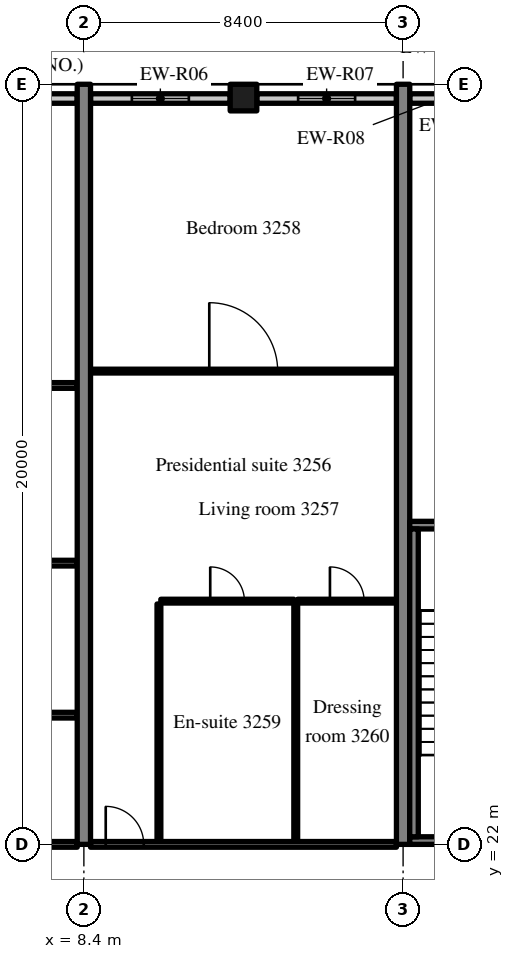
"""IFC4 building model, lengths in metres.
Left out: names, types, materials, properties, quantities, classifications, styles, units other than length and angle.
Written with IfcOpenShell. Run it as: python <this file> out.ifc"""

import sys

from ifc_helpers import new_model, si_unit, direction, frame, frame_2d, origin, origin_2d, place, context, subcontext, project, spatial, rectangle, extrude, source, transform, mapped, element, fill, save


model = new_model("IFC4")
c1 = context("Model", 3, precision=1e-05, world=origin(), true_north=direction((0.0, 1.0)))
c2 = subcontext(c1, "Body", "Model", "MODEL_VIEW")
j1 = project(units=[si_unit("LENGTHUNIT", "METRE"), si_unit("PLANEANGLEUNIT", "RADIAN")], contexts=[c1])
p1 = place(None, origin())
s1 = spatial("IfcSite", under=j1, at=p1, CompositionType="ELEMENT")
p2 = place(p1, origin())
s2 = spatial("IfcBuilding", under=s1, at=p2, CompositionType="ELEMENT")
p3 = place(p2, frame((0.0, 0.0, 133.2)))
s3 = spatial("IfcBuildingStorey", under=s2, at=p3, CompositionType="ELEMENT", Elevation=133.2)
m1 = source(origin(), c2, "Body", "SweptSolid", [
    extrude(rectangle(XDim=20.0, YDim=0.35, at=frame_2d((10.0, 0.0))), origin(), (0.0, 0.0, 1.0), 3.52),
])
for number, where, z_axis, x_axis in (
    (1, (8.4, 22.0, 0.0), (0.0, 0.0, 1.0), (0.0, 1.0, 0.0)),
    (2, (16.8, 22.0, 0.0), (0.0, 0.0, 1.0), (0.0, 1.0, 0.0)),
):
    element("IfcWall", number, at=place(p3, frame(where, z_axis=z_axis, x_axis=x_axis)), inside=s3, PredefinedType="SHEAR", context=c2, shape_type="MappedRepresentation", body=[
        mapped(m1, transform((0.0, 0.0, 0.0), scale=1.0)),
    ])
m2 = source(origin(), c2, "Body", "SweptSolid", [
    extrude(rectangle(XDim=0.7, YDim=0.7, at=origin_2d()), origin(), (0.0, 0.0, 1.0), 3.52),
])
p4 = place(p3, frame((12.6, 41.65, 0.0), z_axis=(0.0, 0.0, 1.0), x_axis=(1.0, 0.0, 0.0)))
e3 = element("IfcColumn", 3, at=p4, inside=s3, PredefinedType="COLUMN", context=c2, shape_type="MappedRepresentation", body=[
    mapped(m2, transform((0.0, 0.0, 0.0), scale=1.0)),
])
m3 = source(origin(), c2, "Body", "SweptSolid", [
    extrude(rectangle(XDim=4.07, YDim=0.25, at=frame_2d((2.035, 0.0))), origin(), (0.0, 0.0, 1.0), 2.82),
])
p5 = place(p3, frame((8.225, 41.625, 0.0), z_axis=(0.0, 0.0, 1.0), x_axis=(-1.0, 0.0, 0.0)))
e4 = element("IfcWall", 4, at=p5, inside=s3, PredefinedType="SOLIDWALL", context=c2, shape_type="MappedRepresentation", body=[
    mapped(m3, transform((0.0, 0.0, 0.0), scale=1.0)),
])
m4 = source(origin(), c2, "Body", "SweptSolid", [
    extrude(rectangle(XDim=1.5, YDim=1.5, at=frame_2d((0.75, 0.75))), frame((0.0, 0.135, 0.0), z_axis=(0.0, -1.0, 0.0), x_axis=(1.0, 0.0, 0.0)), (0.0, 0.0, 1.0), 0.27),
])
p6 = place(p5, frame((1.285, 0.0, 0.9)))
e5 = element("IfcOpeningElement", 5, at=p6, cuts=e4, PredefinedType="OPENING", context=c2, shape_type="MappedRepresentation", body=[
    mapped(m4, transform((0.0, 0.0, 0.0), scale=1.0)),
])
m5 = source(origin(), c2, "Body", "SweptSolid", [
    extrude(rectangle(XDim=3.675, YDim=0.25, at=frame_2d((1.837, 0.0))), origin(), (0.0, 0.0, 1.0), 2.82),
])
p7 = place(p3, frame((12.25, 41.625, 0.0), z_axis=(0.0, 0.0, 1.0), x_axis=(-1.0, 0.0, 0.0)))
e6 = element("IfcWall", 6, at=p7, inside=s3, PredefinedType="SOLIDWALL", context=c2, shape_type="MappedRepresentation", body=[
    mapped(m5, transform((0.0, 0.0, 0.0), scale=1.0)),
])
p8 = place(p7, frame((1.087, 0.0, 0.9)))
e7 = element("IfcOpeningElement", 7, at=p8, cuts=e6, PredefinedType="OPENING", context=c2, shape_type="MappedRepresentation", body=[
    mapped(m4, transform((0.0, 0.0, 0.0), scale=1.0)),
])
p9 = place(p3, frame((16.625, 41.625, 0.0), z_axis=(0.0, 0.0, 1.0), x_axis=(-1.0, 0.0, 0.0)))
e8 = element("IfcWall", 8, at=p9, inside=s3, PredefinedType="SOLIDWALL", context=c2, shape_type="MappedRepresentation", body=[
    mapped(m5, transform((0.0, 0.0, 0.0), scale=1.0)),
])
p10 = place(p9, frame((1.087, 0.0, 0.9)))
e9 = element("IfcOpeningElement", 9, at=p10, cuts=e8, PredefinedType="OPENING", context=c2, shape_type="MappedRepresentation", body=[
    mapped(m4, transform((0.0, 0.0, 0.0), scale=1.0)),
])
m6 = source(origin(), c2, "Body", "SweptSolid", [
    extrude(rectangle(XDim=1.683, YDim=0.25, at=frame_2d((0.841, 0.0))), origin(), (0.0, 0.0, 1.0), 2.82),
])
p11 = place(p3, frame((18.658, 41.625, 0.0), z_axis=(0.0, 0.0, 1.0), x_axis=(-1.0, 0.0, 0.0)))
e10 = element("IfcWall", 10, at=p11, inside=s3, PredefinedType="SOLIDWALL", context=c2, shape_type="MappedRepresentation", body=[
    mapped(m6, transform((0.0, 0.0, 0.0), scale=1.0)),
])
m7 = source(origin(), c2, "Body", "SweptSolid", [
    extrude(rectangle(XDim=8.225, YDim=0.2, at=frame_2d((4.112, 0.0))), origin(), (0.0, 0.0, 1.0), 3.52),
])
p12 = place(p3, frame((16.975, 22.1, 0.0), z_axis=(0.0, 0.0, 1.0), x_axis=(1.0, 0.0, 0.0)))
e11 = element("IfcWall", 11, at=p12, inside=s3, PredefinedType="SOLIDWALL", context=c2, shape_type="MappedRepresentation", body=[
    mapped(m7, transform((0.0, 0.0, 0.0), scale=1.0)),
])
m8 = source(origin(), c2, "Body", "SweptSolid", [
    extrude(rectangle(XDim=1.2, YDim=2.1, at=frame_2d((0.6, 1.05))), frame((0.0, 0.11, 0.0), z_axis=(0.0, -1.0, 0.0), x_axis=(1.0, 0.0, 0.0)), (0.0, 0.0, 1.0), 0.22),
])
p13 = place(p12, frame((6.025, 0.0, 0.0)))
e12 = element("IfcOpeningElement", 12, at=p13, cuts=e11, PredefinedType="OPENING", context=c2, shape_type="MappedRepresentation", body=[
    mapped(m8, transform((0.0, 0.0, 0.0), scale=1.0)),
])
p14 = place(p3, frame((16.975, 30.4, 0.0), z_axis=(0.0, 0.0, 1.0), x_axis=(1.0, 0.0, 0.0)))
e13 = element("IfcWall", 13, at=p14, inside=s3, PredefinedType="SOLIDWALL", context=c2, shape_type="MappedRepresentation", body=[
    mapped(m7, transform((0.0, 0.0, 0.0), scale=1.0)),
])
m9 = source(origin(), c2, "Body", "SweptSolid", [
    extrude(rectangle(XDim=1.0, YDim=2.1, at=frame_2d((0.5, 1.05))), frame((0.0, 0.11, 0.0), z_axis=(0.0, -1.0, 0.0), x_axis=(1.0, 0.0, 0.0)), (0.0, 0.0, 1.0), 0.22),
])
p15 = place(p14, frame((6.125, 0.0, 0.0)))
e14 = element("IfcOpeningElement", 14, at=p15, cuts=e13, PredefinedType="OPENING", context=c2, shape_type="MappedRepresentation", body=[
    mapped(m9, transform((0.0, 0.0, 0.0), scale=1.0)),
])
m10 = source(origin(), c2, "Body", "SweptSolid", [
    extrude(rectangle(XDim=8.1, YDim=0.225, at=frame_2d((4.05, 0.0))), origin(), (0.0, 0.0, 1.0), 3.52),
])
p16 = place(p3, frame((17.087, 22.2, 0.0), z_axis=(0.0, 0.0, 1.0), x_axis=(0.0, 1.0, 0.0)))
e15 = element("IfcWall", 15, at=p16, inside=s3, PredefinedType="SOLIDWALL", context=c2, shape_type="MappedRepresentation", body=[
    mapped(m10, transform((0.0, 0.0, 0.0), scale=1.0)),
])
m11 = source(origin(), c2, "Body", "SweptSolid", [
    extrude(rectangle(XDim=5.325, YDim=0.15, at=frame_2d((2.663, 0.0))), origin(), (0.0, 0.0, 1.0), 2.82),
])
p17 = place(p3, frame((2.9, 22.0, 0.0), z_axis=(0.0, 0.0, 1.0), x_axis=(1.0, 0.0, 0.0)))
e16 = element("IfcWall", 16, at=p17, inside=s3, PredefinedType="PARTITIONING", context=c2, shape_type="MappedRepresentation", body=[
    mapped(m11, transform((0.0, 0.0, 0.0), scale=1.0)),
])
m12 = source(origin(), c2, "Body", "SweptSolid", [
    extrude(rectangle(XDim=5.325, YDim=0.15, at=frame_2d((2.663, 0.0))), origin(), (0.0, 0.0, 1.0), 3.52),
])
for number, where, z_axis, x_axis in (
    (17, (2.9, 25.4, 0.0), (0.0, 0.0, 1.0), (1.0, 0.0, 0.0)),
    (18, (2.9, 29.4, 0.0), (0.0, 0.0, 1.0), (1.0, 0.0, 0.0)),
):
    element("IfcWall", number, at=place(p3, frame(where, z_axis=z_axis, x_axis=x_axis)), inside=s3, PredefinedType="PARTITIONING", context=c2, shape_type="MappedRepresentation", body=[
        mapped(m12, transform((0.0, 0.0, 0.0), scale=1.0)),
    ])
m13 = source(origin(), c2, "Body", "SweptSolid", [
    extrude(rectangle(XDim=7.875, YDim=0.15, at=frame_2d((3.938, 0.0))), origin(), (0.0, 0.0, 1.0), 3.52),
])
p18 = place(p3, frame((0.35, 34.075, 0.0), z_axis=(0.0, 0.0, 1.0), x_axis=(1.0, 0.0, 0.0)))
e19 = element("IfcWall", 19, at=p18, inside=s3, PredefinedType="PARTITIONING", context=c2, shape_type="MappedRepresentation", body=[
    mapped(m13, transform((0.0, 0.0, 0.0), scale=1.0)),
])
m14 = source(origin(), c2, "Body", "SweptSolid", [
    extrude(rectangle(XDim=1.0, YDim=2.1, at=frame_2d((0.5, 1.05))), frame((0.0, 0.085, 0.0), z_axis=(0.0, -1.0, 0.0), x_axis=(1.0, 0.0, 0.0)), (0.0, 0.0, 1.0), 0.17),
])
p19 = place(p18, frame((0.7, 0.0, 0.0)))
e20 = element("IfcOpeningElement", 20, at=p19, cuts=e19, PredefinedType="OPENING", context=c2, shape_type="MappedRepresentation", body=[
    mapped(m14, transform((0.0, 0.0, 0.0), scale=1.0)),
])
m15 = source(origin(), c2, "Body", "SweptSolid", [
    extrude(rectangle(XDim=6.25, YDim=0.1, at=frame_2d((3.125, 0.0))), origin(), (0.0, 0.0, 1.0), 3.52),
])
for number, where, z_axis, x_axis in (
    (21, (10.375, 22.075, 0.0), (0.0, 0.0, 1.0), (0.0, 1.0, 0.0)),
    (22, (13.975, 22.075, 0.0), (0.0, 0.0, 1.0), (0.0, 1.0, 0.0)),
):
    element("IfcWall", number, at=place(p3, frame(where, z_axis=z_axis, x_axis=x_axis)), inside=s3, PredefinedType="PARTITIONING", context=c2, shape_type="MappedRepresentation", body=[
        mapped(m15, transform((0.0, 0.0, 0.0), scale=1.0)),
    ])
m16 = source(origin(), c2, "Body", "SweptSolid", [
    extrude(rectangle(XDim=3.5, YDim=0.1, at=frame_2d((1.75, 0.0))), origin(), (0.0, 0.0, 1.0), 3.52),
])
p20 = place(p3, frame((10.425, 28.4, 0.0), z_axis=(0.0, 0.0, 1.0), x_axis=(1.0, 0.0, 0.0)))
e23 = element("IfcWall", 23, at=p20, inside=s3, PredefinedType="PARTITIONING", context=c2, shape_type="MappedRepresentation", body=[
    mapped(m16, transform((0.0, 0.0, 0.0), scale=1.0)),
])
m17 = source(origin(), c2, "Body", "SweptSolid", [
    extrude(rectangle(XDim=0.9, YDim=2.1, at=frame_2d((0.45, 1.05))), frame((0.0, 0.06, 0.0), z_axis=(0.0, -1.0, 0.0), x_axis=(1.0, 0.0, 0.0)), (0.0, 0.0, 1.0), 0.12),
])
p21 = place(p20, frame((1.3, 0.0, 0.0)))
e24 = element("IfcOpeningElement", 24, at=p21, cuts=e23, PredefinedType="OPENING", context=c2, shape_type="MappedRepresentation", body=[
    mapped(m17, transform((0.0, 0.0, 0.0), scale=1.0)),
])
m18 = source(origin(), c2, "Body", "SweptSolid", [
    extrude(rectangle(XDim=2.6, YDim=0.1, at=frame_2d((1.3, 0.0))), origin(), (0.0, 0.0, 1.0), 3.52),
])
p22 = place(p3, frame((14.025, 28.4, 0.0), z_axis=(0.0, 0.0, 1.0), x_axis=(1.0, 0.0, 0.0)))
e25 = element("IfcWall", 25, at=p22, inside=s3, PredefinedType="PARTITIONING", context=c2, shape_type="MappedRepresentation", body=[
    mapped(m18, transform((0.0, 0.0, 0.0), scale=1.0)),
])
p23 = place(p22, frame((0.85, 0.0, 0.0)))
e26 = element("IfcOpeningElement", 26, at=p23, cuts=e25, PredefinedType="OPENING", context=c2, shape_type="MappedRepresentation", body=[
    mapped(m17, transform((0.0, 0.0, 0.0), scale=1.0)),
])
m19 = source(origin(), c2, "Body", "SweptSolid", [
    extrude(rectangle(XDim=8.05, YDim=0.1, at=frame_2d((4.025, 0.0))), origin(), (0.0, 0.0, 1.0), 3.52),
])
p24 = place(p3, frame((8.575, 34.453, 0.0), z_axis=(0.0, 0.0, 1.0), x_axis=(1.0, 0.0, 0.0)))
e27 = element("IfcWall", 27, at=p24, inside=s3, PredefinedType="PARTITIONING", context=c2, shape_type="MappedRepresentation", body=[
    mapped(m19, transform((0.0, 0.0, 0.0), scale=1.0)),
])
m20 = source(origin(), c2, "Body", "SweptSolid", [
    extrude(rectangle(XDim=1.8, YDim=2.1, at=frame_2d((0.9, 1.05))), frame((0.0, 0.06, 0.0), z_axis=(0.0, -1.0, 0.0), x_axis=(1.0, 0.0, 0.0)), (0.0, 0.0, 1.0), 0.12),
])
p25 = place(p24, frame((3.125, 0.0, 0.0)))
e28 = element("IfcOpeningElement", 28, at=p25, cuts=e27, PredefinedType="OPENING", context=c2, shape_type="MappedRepresentation", body=[
    mapped(m20, transform((0.0, 0.0, 0.0), scale=1.0)),
])
m21 = source(origin(), c2, "Body", "SweptSolid", [
    extrude(rectangle(XDim=8.05, YDim=0.15, at=frame_2d((4.025, 0.0))), origin(), (0.0, 0.0, 1.0), 2.82),
])
p26 = place(p3, frame((8.575, 22.0, 0.0), z_axis=(0.0, 0.0, 1.0), x_axis=(1.0, 0.0, 0.0)))
e29 = element("IfcWall", 29, at=p26, inside=s3, PredefinedType="PARTITIONING", context=c2, shape_type="MappedRepresentation", body=[
    mapped(m21, transform((0.0, 0.0, 0.0), scale=1.0)),
])
p27 = place(p26, frame((0.4, 0.0, 0.0)))
e30 = element("IfcOpeningElement", 30, at=p27, cuts=e29, PredefinedType="OPENING", context=c2, shape_type="MappedRepresentation", body=[
    mapped(m14, transform((0.0, 0.0, 0.0), scale=1.0)),
])
m22 = source(origin(), c2, "Body", "SweptSolid", [
    extrude(rectangle(XDim=1.5, YDim=1.5, at=frame_2d((0.75, 0.75))), frame((0.0, 0.03, 0.0), z_axis=(0.0, -1.0, 0.0), x_axis=(1.0, 0.0, 0.0)), (0.0, 0.0, 1.0), 0.06),
])
p28 = place(p8, origin())
e31 = element("IfcWindow", 31, at=p28, inside=s3, PartitioningType="SINGLE_PANEL", PredefinedType="WINDOW", context=c2, shape_type="MappedRepresentation", body=[
    mapped(m22, transform((0.0, 0.0, 0.0), scale=1.0)),
])
fill(e7, e31)
p29 = place(p10, origin())
e32 = element("IfcWindow", 32, at=p29, inside=s3, PartitioningType="SINGLE_PANEL", PredefinedType="WINDOW", context=c2, shape_type="MappedRepresentation", body=[
    mapped(m22, transform((0.0, 0.0, 0.0), scale=1.0)),
])
fill(e9, e32)
m23 = source(origin(), c2, "Body", "SweptSolid", [
    extrude(rectangle(XDim=0.9, YDim=2.1, at=frame_2d((0.45, 1.05))), frame((0.0, 0.025, 0.0), z_axis=(0.0, -1.0, 0.0), x_axis=(1.0, 0.0, 0.0)), (0.0, 0.0, 1.0), 0.05),
])
p30 = place(p21, origin())
e33 = element("IfcDoor", 33, at=p30, inside=s3, OperationType="SINGLE_SWING_LEFT", PredefinedType="DOOR", context=c2, shape_type="MappedRepresentation", body=[
    mapped(m23, transform((0.0, 0.0, 0.0), scale=1.0)),
])
fill(e24, e33)
p31 = place(p23, origin())
e34 = element("IfcDoor", 34, at=p31, inside=s3, OperationType="SINGLE_SWING_LEFT", PredefinedType="DOOR", context=c2, shape_type="MappedRepresentation", body=[
    mapped(m23, transform((0.0, 0.0, 0.0), scale=1.0)),
])
fill(e26, e34)
m24 = source(origin(), c2, "Body", "SweptSolid", [
    extrude(rectangle(XDim=1.8, YDim=2.1, at=frame_2d((0.9, 1.05))), frame((0.0, 0.025, 0.0), z_axis=(0.0, -1.0, 0.0), x_axis=(1.0, 0.0, 0.0)), (0.0, 0.0, 1.0), 0.05),
])
p32 = place(p25, origin())
e35 = element("IfcDoor", 35, at=p32, inside=s3, OperationType="DOUBLE_DOOR_SINGLE_SWING", PredefinedType="DOOR", context=c2, shape_type="MappedRepresentation", body=[
    mapped(m24, transform((0.0, 0.0, 0.0), scale=1.0)),
])
fill(e28, e35)
m25 = source(origin(), c2, "Body", "SweptSolid", [
    extrude(rectangle(XDim=1.0, YDim=2.1, at=frame_2d((0.5, 1.05))), frame((0.0, 0.025, 0.0), z_axis=(0.0, -1.0, 0.0), x_axis=(1.0, 0.0, 0.0)), (0.0, 0.0, 1.0), 0.05),
])
p33 = place(p27, origin())
e36 = element("IfcDoor", 36, at=p33, inside=s3, OperationType="SINGLE_SWING_LEFT", PredefinedType="DOOR", context=c2, shape_type="MappedRepresentation", body=[
    mapped(m25, transform((0.0, 0.0, 0.0), scale=1.0)),
])
fill(e30, e36)
save(model, sys.argv[1])
